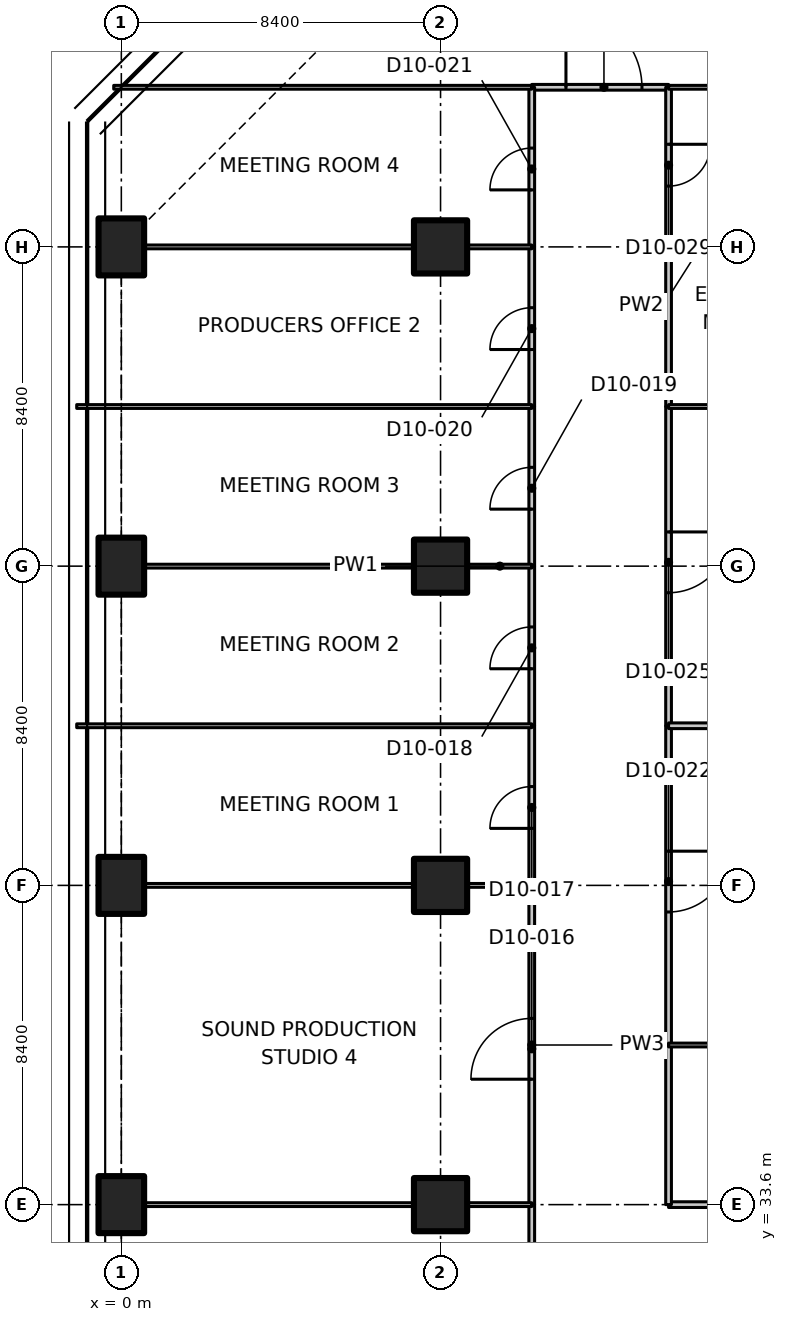
"""IFC4 building model, lengths in metres.
Left out: names, types, materials, properties, quantities, classifications, styles, units other than length and angle.
Written with IfcOpenShell. Run it as: python <this file> out.ifc"""

import sys

from ifc_helpers import new_model, si_unit, direction, frame, frame_2d, origin, origin_2d, place, context, subcontext, project, spatial, polyline, rectangle, outline, extrude, element, fill, save


model = new_model("IFC4")
c1 = context("Model", 3, precision=1e-05, world=origin(), true_north=direction((0.0, 1.0)))
c2 = subcontext(c1, "Body", "Model", "MODEL_VIEW")
j1 = project(units=[si_unit("LENGTHUNIT", "METRE"), si_unit("PLANEANGLEUNIT", "RADIAN")], contexts=[c1])
p1 = place(None, origin())
s1 = spatial("IfcSite", under=j1, at=p1, CompositionType="ELEMENT")
p2 = place(p1, origin())
s2 = spatial("IfcBuilding", under=s1, at=p2, CompositionType="ELEMENT")
p3 = place(p2, frame((0.0, 0.0, 72.5)))
s3 = spatial("IfcBuildingStorey", under=s2, at=p3, CompositionType="ELEMENT", Elevation=72.5)
for number, where, z_axis, x_axis in (
    (1, (0.0, 33.6, 0.0), (0.0, 0.0, 1.0), (1.0, 0.0, 0.0)),
    (2, (0.0, 42.0, 0.0), (0.0, 0.0, 1.0), (1.0, 0.0, 0.0)),
    (3, (0.0, 50.4, 0.0), (0.0, 0.0, 1.0), (1.0, 0.0, 0.0)),
    (4, (0.0, 58.8, 0.0), (0.0, 0.0, 1.0), (1.0, 0.0, 0.0)),
):
    element("IfcColumn", number, at=place(p3, frame(where, z_axis=z_axis, x_axis=x_axis)), inside=s3, PredefinedType="COLUMN", context=c2, shape_type="SweptSolid", body=[
        extrude(rectangle(XDim=1.2, YDim=1.5, at=origin_2d()), origin(), (0.0, 0.0, 1.0), 3.35),
    ])
for number, where, z_axis, x_axis in (
    (5, (8.4, 33.6, 0.0), (0.0, 0.0, 1.0), (1.0, 0.0, 0.0)),
    (6, (8.4, 42.0, 0.0), (0.0, 0.0, 1.0), (1.0, 0.0, 0.0)),
    (7, (8.4, 50.4, 0.0), (0.0, 0.0, 1.0), (1.0, 0.0, 0.0)),
    (8, (8.4, 58.8, 0.0), (0.0, 0.0, 1.0), (1.0, 0.0, 0.0)),
):
    element("IfcColumn", number, at=place(p3, frame(where, z_axis=z_axis, x_axis=x_axis)), inside=s3, PredefinedType="COLUMN", context=c2, shape_type="SweptSolid", body=[
        extrude(rectangle(XDim=1.4, YDim=1.4, at=origin_2d()), origin(), (0.0, 0.0, 1.0), 3.35),
    ])
p4 = place(p3, frame((10.8, 25.2, 0.0), z_axis=(0.0, 0.0, 1.0), x_axis=(0.0, 1.0, 0.0)))
e9 = element("IfcWall", 9, at=p4, inside=s3, PredefinedType="PARTITIONING", context=c2, shape_type="SweptSolid", body=[
    extrude(rectangle(XDim=8.4, YDim=0.15, at=frame_2d((4.2, 0.0))), origin(), (0.0, 0.0, 1.0), 3.33),
])
p5 = place(p4, frame((3.3, 0.0, 0.0)))
e10 = element("IfcOpeningElement", 10, at=p5, cuts=e9, PredefinedType="OPENING", context=c2, shape_type="SweptSolid", body=[
    extrude(rectangle(XDim=1.6, YDim=2.1, at=frame_2d((0.8, 1.05))), frame((0.0, 0.085, 0.0), z_axis=(0.0, -1.0, 0.0), x_axis=(1.0, 0.0, 0.0)), (0.0, 0.0, 1.0), 0.17),
])
p6 = place(p3, frame((14.4, 33.6, 0.0), z_axis=(0.0, 0.0, 1.0), x_axis=(1.0, 0.0, 0.0)))
e11 = element("IfcWall", 11, at=p6, inside=s3, PredefinedType="PARTITIONING", context=c2, shape_type="SweptSolid", body=[
    extrude(rectangle(XDim=1.5, YDim=0.15, at=frame_2d((0.75, 0.0))), origin(), (0.0, 0.0, 1.0), 3.33),
])
p7 = place(p3, frame((10.8, 63.0, 0.0), z_axis=(0.0, 0.0, 1.0), x_axis=(1.0, 0.0, 0.0)))
e12 = element("IfcWall", 12, at=p7, inside=s3, PredefinedType="PARTITIONING", context=c2, shape_type="SweptSolid", body=[
    extrude(rectangle(XDim=3.6, YDim=0.15, at=frame_2d((1.8, 0.0))), origin(), (0.0, 0.0, 1.0), 3.33),
])
p8 = place(p7, frame((0.9, 0.0, 0.0)))
e13 = element("IfcOpeningElement", 13, at=p8, cuts=e12, PredefinedType="OPENING", context=c2, shape_type="SweptSolid", body=[
    extrude(rectangle(XDim=2.0, YDim=2.4, at=frame_2d((1.0, 1.2))), frame((0.0, 0.085, 0.0), z_axis=(0.0, -1.0, 0.0), x_axis=(1.0, 0.0, 0.0)), (0.0, 0.0, 1.0), 0.17),
])
p9 = place(p3, frame((10.8, 33.6, 0.0), z_axis=(0.0, 0.0, 1.0), x_axis=(0.0, 1.0, 0.0)))
e14 = element("IfcWall", 14, at=p9, inside=s3, PredefinedType="PARTITIONING", context=c2, shape_type="SweptSolid", body=[
    extrude(rectangle(XDim=8.4, YDim=0.15, at=frame_2d((4.2, 0.0))), origin(), (0.0, 0.0, 1.0), 3.33),
])
p10 = place(p9, frame((3.3, 0.0, 0.0)))
e15 = element("IfcOpeningElement", 15, at=p10, cuts=e14, PredefinedType="OPENING", context=c2, shape_type="SweptSolid", body=[
    extrude(rectangle(XDim=1.6, YDim=2.1, at=frame_2d((0.8, 1.05))), frame((0.0, 0.085, 0.0), z_axis=(0.0, -1.0, 0.0), x_axis=(1.0, 0.0, 0.0)), (0.0, 0.0, 1.0), 0.17),
])
p11 = place(p3, frame((10.8, 42.0, 0.0), z_axis=(0.0, 0.0, 1.0), x_axis=(0.0, 1.0, 0.0)))
e16 = element("IfcWall", 16, at=p11, inside=s3, PredefinedType="PARTITIONING", context=c2, shape_type="SweptSolid", body=[
    extrude(rectangle(XDim=4.2, YDim=0.15, at=frame_2d((2.1, 0.0))), origin(), (0.0, 0.0, 1.0), 3.33),
])
p12 = place(p11, frame((1.5, 0.0, 0.0)))
e17 = element("IfcOpeningElement", 17, at=p12, cuts=e16, PredefinedType="OPENING", context=c2, shape_type="SweptSolid", body=[
    extrude(rectangle(XDim=1.1, YDim=2.1, at=frame_2d((0.55, 1.05))), frame((0.0, 0.085, 0.0), z_axis=(0.0, -1.0, 0.0), x_axis=(1.0, 0.0, 0.0)), (0.0, 0.0, 1.0), 0.17),
])
p13 = place(p3, frame((10.8, 46.2, 0.0), z_axis=(0.0, 0.0, 1.0), x_axis=(0.0, 1.0, 0.0)))
e18 = element("IfcWall", 18, at=p13, inside=s3, PredefinedType="PARTITIONING", context=c2, shape_type="SweptSolid", body=[
    extrude(rectangle(XDim=4.2, YDim=0.15, at=frame_2d((2.1, 0.0))), origin(), (0.0, 0.0, 1.0), 3.33),
])
p14 = place(p13, frame((1.5, 0.0, 0.0)))
e19 = element("IfcOpeningElement", 19, at=p14, cuts=e18, PredefinedType="OPENING", context=c2, shape_type="SweptSolid", body=[
    extrude(rectangle(XDim=1.1, YDim=2.1, at=frame_2d((0.55, 1.05))), frame((0.0, 0.085, 0.0), z_axis=(0.0, -1.0, 0.0), x_axis=(1.0, 0.0, 0.0)), (0.0, 0.0, 1.0), 0.17),
])
p15 = place(p3, frame((10.8, 50.4, 0.0), z_axis=(0.0, 0.0, 1.0), x_axis=(0.0, 1.0, 0.0)))
e20 = element("IfcWall", 20, at=p15, inside=s3, PredefinedType="PARTITIONING", context=c2, shape_type="SweptSolid", body=[
    extrude(rectangle(XDim=4.2, YDim=0.15, at=frame_2d((2.1, 0.0))), origin(), (0.0, 0.0, 1.0), 3.33),
])
p16 = place(p15, frame((1.5, 0.0, 0.0)))
e21 = element("IfcOpeningElement", 21, at=p16, cuts=e20, PredefinedType="OPENING", context=c2, shape_type="SweptSolid", body=[
    extrude(rectangle(XDim=1.1, YDim=2.1, at=frame_2d((0.55, 1.05))), frame((0.0, 0.085, 0.0), z_axis=(0.0, -1.0, 0.0), x_axis=(1.0, 0.0, 0.0)), (0.0, 0.0, 1.0), 0.17),
])
p17 = place(p3, frame((10.8, 54.6, 0.0), z_axis=(0.0, 0.0, 1.0), x_axis=(0.0, 1.0, 0.0)))
e22 = element("IfcWall", 22, at=p17, inside=s3, PredefinedType="PARTITIONING", context=c2, shape_type="SweptSolid", body=[
    extrude(rectangle(XDim=4.2, YDim=0.15, at=frame_2d((2.1, 0.0))), origin(), (0.0, 0.0, 1.0), 3.33),
])
p18 = place(p17, frame((1.5, 0.0, 0.0)))
e23 = element("IfcOpeningElement", 23, at=p18, cuts=e22, PredefinedType="OPENING", context=c2, shape_type="SweptSolid", body=[
    extrude(rectangle(XDim=1.1, YDim=2.1, at=frame_2d((0.55, 1.05))), frame((0.0, 0.085, 0.0), z_axis=(0.0, -1.0, 0.0), x_axis=(1.0, 0.0, 0.0)), (0.0, 0.0, 1.0), 0.17),
])
p19 = place(p3, frame((10.8, 58.8, 0.0), z_axis=(0.0, 0.0, 1.0), x_axis=(0.0, 1.0, 0.0)))
e24 = element("IfcWall", 24, at=p19, inside=s3, PredefinedType="PARTITIONING", context=c2, shape_type="SweptSolid", body=[
    extrude(rectangle(XDim=4.2, YDim=0.15, at=frame_2d((2.1, 0.0))), origin(), (0.0, 0.0, 1.0), 3.33),
])
p20 = place(p19, frame((1.5, 0.0, 0.0)))
e25 = element("IfcOpeningElement", 25, at=p20, cuts=e24, PredefinedType="OPENING", context=c2, shape_type="SweptSolid", body=[
    extrude(rectangle(XDim=1.1, YDim=2.1, at=frame_2d((0.55, 1.05))), frame((0.0, 0.085, 0.0), z_axis=(0.0, -1.0, 0.0), x_axis=(1.0, 0.0, 0.0)), (0.0, 0.0, 1.0), 0.17),
])
p21 = place(p3, frame((14.4, 46.2, 0.0), z_axis=(0.0, 0.0, 1.0), x_axis=(0.0, -1.0, 0.0)))
e26 = element("IfcWall", 26, at=p21, inside=s3, PredefinedType="PARTITIONING", context=c2, shape_type="SweptSolid", body=[
    extrude(rectangle(XDim=8.4, YDim=0.15, at=frame_2d((4.2, 0.0))), origin(), (0.0, 0.0, 1.0), 3.33),
])
p22 = place(p21, frame((3.3, 0.0, 0.0)))
e27 = element("IfcOpeningElement", 27, at=p22, cuts=e26, PredefinedType="OPENING", context=c2, shape_type="SweptSolid", body=[
    extrude(rectangle(XDim=1.6, YDim=2.1, at=frame_2d((0.8, 1.05))), frame((0.0, 0.085, 0.0), z_axis=(0.0, -1.0, 0.0), x_axis=(1.0, 0.0, 0.0)), (0.0, 0.0, 1.0), 0.17),
])
p23 = place(p3, frame((14.4, 37.8, 0.0), z_axis=(0.0, 0.0, 1.0), x_axis=(0.0, -1.0, 0.0)))
e28 = element("IfcWall", 28, at=p23, inside=s3, PredefinedType="PARTITIONING", context=c2, shape_type="SweptSolid", body=[
    extrude(rectangle(XDim=4.2, YDim=0.15, at=frame_2d((2.1, 0.0))), origin(), (0.0, 0.0, 1.0), 3.33),
])
p24 = place(p3, frame((14.4, 54.6, 0.0), z_axis=(0.0, 0.0, 1.0), x_axis=(0.0, -1.0, 0.0)))
e29 = element("IfcWall", 29, at=p24, inside=s3, PredefinedType="PARTITIONING", context=c2, shape_type="SweptSolid", body=[
    extrude(rectangle(XDim=8.4, YDim=0.15, at=frame_2d((4.2, 0.0))), origin(), (0.0, 0.0, 1.0), 3.33),
])
p25 = place(p24, frame((3.3, 0.0, 0.0)))
e30 = element("IfcOpeningElement", 30, at=p25, cuts=e29, PredefinedType="OPENING", context=c2, shape_type="SweptSolid", body=[
    extrude(rectangle(XDim=1.6, YDim=2.1, at=frame_2d((0.8, 1.05))), frame((0.0, 0.085, 0.0), z_axis=(0.0, -1.0, 0.0), x_axis=(1.0, 0.0, 0.0)), (0.0, 0.0, 1.0), 0.17),
])
p26 = place(p3, frame((14.4, 58.8, 0.0), z_axis=(0.0, 0.0, 1.0), x_axis=(0.0, -1.0, 0.0)))
e31 = element("IfcWall", 31, at=p26, inside=s3, PredefinedType="PARTITIONING", context=c2, shape_type="SweptSolid", body=[
    extrude(rectangle(XDim=4.2, YDim=0.15, at=frame_2d((2.1, 0.0))), origin(), (0.0, 0.0, 1.0), 3.33),
])
p27 = place(p3, frame((14.4, 63.0, 0.0), z_axis=(0.0, 0.0, 1.0), x_axis=(0.0, -1.0, 0.0)))
e32 = element("IfcWall", 32, at=p27, inside=s3, PredefinedType="PARTITIONING", context=c2, shape_type="SweptSolid", body=[
    extrude(rectangle(XDim=4.2, YDim=0.15, at=frame_2d((2.1, 0.0))), origin(), (0.0, 0.0, 1.0), 3.33),
])
p28 = place(p27, frame((1.5, 0.0, 0.0)))
e33 = element("IfcOpeningElement", 33, at=p28, cuts=e32, PredefinedType="OPENING", context=c2, shape_type="SweptSolid", body=[
    extrude(rectangle(XDim=1.1, YDim=2.1, at=frame_2d((0.55, 1.05))), frame((0.0, 0.085, 0.0), z_axis=(0.0, -1.0, 0.0), x_axis=(1.0, 0.0, 0.0)), (0.0, 0.0, 1.0), 0.17),
])
p29 = place(p3, frame((10.8, 63.0, 0.0), z_axis=(0.0, 0.0, 1.0), x_axis=(-1.0, 0.0, 0.0)))
e34 = element("IfcWall", 34, at=p29, inside=s3, PredefinedType="PARTITIONING", context=c2, shape_type="SweptSolid", body=[
    extrude(outline(polyline([(0.0, 0.0), (11.0, 0.0), (11.0, 3.33), (7.266, 3.33), (7.264, 2.98), (5.936, 2.98), (5.934, 3.33), (0.0, 3.33), (0.0, 0.0)])), frame((0.0, 0.05, 0.0), z_axis=(0.0, -1.0, 0.0), x_axis=(1.0, 0.0, 0.0)), (0.0, 0.0, 1.0), 0.1),
])
p30 = place(p3, frame((25.4, 63.0, 0.0), z_axis=(0.0, 0.0, 1.0), x_axis=(-1.0, 0.0, 0.0)))
e35 = element("IfcWall", 35, at=p30, inside=s3, PredefinedType="PARTITIONING", context=c2, shape_type="SweptSolid", body=[
    extrude(outline(polyline([(0.0, 0.0), (11.0, 0.0), (11.0, 3.33), (5.066, 3.33), (5.064, 2.98), (3.736, 2.98), (3.734, 3.33), (0.0, 3.33), (0.0, 0.0)])), frame((0.0, 0.05, 0.0), z_axis=(0.0, -1.0, 0.0), x_axis=(1.0, 0.0, 0.0)), (0.0, 0.0, 1.0), 0.1),
])
p31 = place(p3, frame((0.62, 33.6, 0.0), z_axis=(0.0, 0.0, 1.0), x_axis=(1.0, 0.0, 0.0)))
e36 = element("IfcWall", 36, at=p31, inside=s3, PredefinedType="PARTITIONING", context=c2, shape_type="SweptSolid", body=[
    extrude(rectangle(XDim=7.06, YDim=0.1, at=frame_2d((3.53, 0.0))), origin(), (0.0, 0.0, 1.0), 3.33),
])
p32 = place(p3, frame((9.12, 33.6, 0.0), z_axis=(0.0, 0.0, 1.0), x_axis=(1.0, 0.0, 0.0)))
e37 = element("IfcWall", 37, at=p32, inside=s3, PredefinedType="PARTITIONING", context=c2, shape_type="SweptSolid", body=[
    extrude(rectangle(XDim=1.68, YDim=0.1, at=frame_2d((0.84, 0.0))), origin(), (0.0, 0.0, 1.0), 3.33),
])
p33 = place(p3, frame((0.62, 42.0, 0.0), z_axis=(0.0, 0.0, 1.0), x_axis=(1.0, 0.0, 0.0)))
e38 = element("IfcWall", 38, at=p33, inside=s3, PredefinedType="PARTITIONING", context=c2, shape_type="SweptSolid", body=[
    extrude(rectangle(XDim=7.06, YDim=0.1, at=frame_2d((3.53, 0.0))), origin(), (0.0, 0.0, 1.0), 3.33),
])
p34 = place(p3, frame((9.12, 42.0, 0.0), z_axis=(0.0, 0.0, 1.0), x_axis=(1.0, 0.0, 0.0)))
e39 = element("IfcWall", 39, at=p34, inside=s3, PredefinedType="PARTITIONING", context=c2, shape_type="SweptSolid", body=[
    extrude(rectangle(XDim=1.68, YDim=0.1, at=frame_2d((0.84, 0.0))), origin(), (0.0, 0.0, 1.0), 3.33),
])
p35 = place(p3, frame((-1.174, 46.2, 0.0), z_axis=(0.0, 0.0, 1.0), x_axis=(1.0, 0.0, 0.0)))
e40 = element("IfcWall", 40, at=p35, inside=s3, PredefinedType="PARTITIONING", context=c2, shape_type="SweptSolid", body=[
    extrude(outline(polyline([(0.0, 0.0), (11.974, 0.0), (11.974, 3.33), (1.624, 3.33), (1.622, 2.98), (0.726, 2.98), (0.724, 3.33), (0.074, 3.33), (0.0, 3.33), (0.0, 0.0)])), frame((0.0, 0.05, 0.0), z_axis=(0.0, -1.0, 0.0), x_axis=(1.0, 0.0, 0.0)), (0.0, 0.0, 1.0), 0.1),
])
p36 = place(p3, frame((0.62, 50.4, 0.0), z_axis=(0.0, 0.0, 1.0), x_axis=(1.0, 0.0, 0.0)))
e41 = element("IfcWall", 41, at=p36, inside=s3, PredefinedType="PARTITIONING", context=c2, shape_type="SweptSolid", body=[
    extrude(rectangle(XDim=7.06, YDim=0.1, at=frame_2d((3.53, 0.0))), origin(), (0.0, 0.0, 1.0), 3.33),
])
p37 = place(p3, frame((9.12, 50.4, 0.0), z_axis=(0.0, 0.0, 1.0), x_axis=(1.0, 0.0, 0.0)))
e42 = element("IfcWall", 42, at=p37, inside=s3, PredefinedType="PARTITIONING", context=c2, shape_type="SweptSolid", body=[
    extrude(rectangle(XDim=1.68, YDim=0.1, at=frame_2d((0.84, 0.0))), origin(), (0.0, 0.0, 1.0), 3.33),
])
p38 = place(p3, frame((-1.174, 54.6, 0.0), z_axis=(0.0, 0.0, 1.0), x_axis=(1.0, 0.0, 0.0)))
e43 = element("IfcWall", 43, at=p38, inside=s3, PredefinedType="PARTITIONING", context=c2, shape_type="SweptSolid", body=[
    extrude(outline(polyline([(0.0, 0.0), (11.974, 0.0), (11.974, 3.33), (1.624, 3.33), (1.622, 2.98), (0.726, 2.98), (0.724, 3.33), (0.074, 3.33), (0.0, 3.33), (0.0, 0.0)])), frame((0.0, 0.05, 0.0), z_axis=(0.0, -1.0, 0.0), x_axis=(1.0, 0.0, 0.0)), (0.0, 0.0, 1.0), 0.1),
])
p39 = place(p3, frame((0.62, 58.8, 0.0), z_axis=(0.0, 0.0, 1.0), x_axis=(1.0, 0.0, 0.0)))
e44 = element("IfcWall", 44, at=p39, inside=s3, PredefinedType="PARTITIONING", context=c2, shape_type="SweptSolid", body=[
    extrude(rectangle(XDim=7.06, YDim=0.1, at=frame_2d((3.53, 0.0))), origin(), (0.0, 0.0, 1.0), 3.33),
])
p40 = place(p3, frame((9.12, 58.8, 0.0), z_axis=(0.0, 0.0, 1.0), x_axis=(1.0, 0.0, 0.0)))
e45 = element("IfcWall", 45, at=p40, inside=s3, PredefinedType="PARTITIONING", context=c2, shape_type="SweptSolid", body=[
    extrude(rectangle(XDim=1.68, YDim=0.1, at=frame_2d((0.84, 0.0))), origin(), (0.0, 0.0, 1.0), 3.33),
])
p41 = place(p3, frame((24.0, 37.8, 0.0), z_axis=(0.0, 0.0, 1.0), x_axis=(-1.0, 0.0, 0.0)))
e46 = element("IfcWall", 46, at=p41, inside=s3, PredefinedType="PARTITIONING", context=c2, shape_type="SweptSolid", body=[
    extrude(rectangle(XDim=9.6, YDim=0.1, at=frame_2d((4.8, 0.0))), origin(), (0.0, 0.0, 1.0), 3.33),
])
p42 = place(p41, frame((4.2, 0.0, 0.0)))
e47 = element("IfcOpeningElement", 47, at=p42, cuts=e46, PredefinedType="OPENING", context=c2, shape_type="SweptSolid", body=[
    extrude(rectangle(XDim=1.2, YDim=2.1, at=frame_2d((0.6, 1.05))), frame((0.0, 0.06, 0.0), z_axis=(0.0, -1.0, 0.0), x_axis=(1.0, 0.0, 0.0)), (0.0, 0.0, 1.0), 0.12),
])
p43 = place(p3, frame((14.4, 46.2, 0.0), z_axis=(0.0, 0.0, 1.0), x_axis=(1.0, 0.0, 0.0)))
e48 = element("IfcWall", 48, at=p43, inside=s3, PredefinedType="PARTITIONING", context=c2, shape_type="SweptSolid", body=[
    extrude(outline(polyline([(0.0, 0.0), (11.974, 0.0), (11.974, 3.33), (11.9, 3.33), (11.25, 3.33), (11.248, 2.98), (10.352, 2.98), (10.35, 3.33), (0.0, 3.33), (0.0, 0.0)])), frame((0.0, 0.075, 0.0), z_axis=(0.0, -1.0, 0.0), x_axis=(1.0, 0.0, 0.0)), (0.0, 0.0, 1.0), 0.15),
])
p44 = place(p3, frame((14.4, 54.6, 0.0), z_axis=(0.0, 0.0, 1.0), x_axis=(1.0, 0.0, 0.0)))
e49 = element("IfcWall", 49, at=p44, inside=s3, PredefinedType="PARTITIONING", context=c2, shape_type="SweptSolid", body=[
    extrude(rectangle(XDim=4.2, YDim=0.1, at=frame_2d((2.1, 0.0))), origin(), (0.0, 0.0, 1.0), 3.33),
])
p45 = place(p44, frame((1.8, 0.0, 0.0)))
e50 = element("IfcOpeningElement", 50, at=p45, cuts=e49, PredefinedType="OPENING", context=c2, shape_type="SweptSolid", body=[
    extrude(rectangle(XDim=0.9, YDim=2.1, at=frame_2d((0.45, 1.05))), frame((0.0, 0.06, 0.0), z_axis=(0.0, -1.0, 0.0), x_axis=(1.0, 0.0, 0.0)), (0.0, 0.0, 1.0), 0.12),
])
p46 = place(p3, frame((14.4, 58.8, 0.0), z_axis=(0.0, 0.0, 1.0), x_axis=(1.0, 0.0, 0.0)))
e51 = element("IfcWall", 51, at=p46, inside=s3, PredefinedType="PARTITIONING", context=c2, shape_type="SweptSolid", body=[
    extrude(rectangle(XDim=1.68, YDim=0.125, at=frame_2d((0.84, 0.0))), origin(), (0.0, 0.0, 1.0), 3.33),
])
p47 = place(p8, origin())
e52 = element("IfcDoor", 52, at=p47, inside=s3, OperationType="DOUBLE_DOOR_SINGLE_SWING", PredefinedType="DOOR", context=c2, shape_type="SweptSolid", body=[
    extrude(rectangle(XDim=2.0, YDim=2.4, at=frame_2d((1.0, 1.2))), frame((0.0, 0.025, 0.0), z_axis=(0.0, -1.0, 0.0), x_axis=(1.0, 0.0, 0.0)), (0.0, 0.0, 1.0), 0.05),
])
fill(e13, e52)
p48 = place(p10, origin())
e53 = element("IfcDoor", 53, at=p48, inside=s3, OperationType="DOUBLE_DOOR_SINGLE_SWING", PredefinedType="DOOR", context=c2, shape_type="SweptSolid", body=[
    extrude(rectangle(XDim=1.6, YDim=2.1, at=frame_2d((0.8, 1.05))), frame((0.0, 0.025, 0.0), z_axis=(0.0, -1.0, 0.0), x_axis=(1.0, 0.0, 0.0)), (0.0, 0.0, 1.0), 0.05),
])
fill(e15, e53)
p49 = place(p12, origin())
e54 = element("IfcDoor", 54, at=p49, inside=s3, OperationType="SINGLE_SWING_LEFT", PredefinedType="DOOR", context=c2, shape_type="SweptSolid", body=[
    extrude(rectangle(XDim=1.1, YDim=2.1, at=frame_2d((0.55, 1.05))), frame((0.0, 0.025, 0.0), z_axis=(0.0, -1.0, 0.0), x_axis=(1.0, 0.0, 0.0)), (0.0, 0.0, 1.0), 0.05),
])
fill(e17, e54)
p50 = place(p14, origin())
e55 = element("IfcDoor", 55, at=p50, inside=s3, OperationType="SINGLE_SWING_LEFT", PredefinedType="DOOR", context=c2, shape_type="SweptSolid", body=[
    extrude(rectangle(XDim=1.1, YDim=2.1, at=frame_2d((0.55, 1.05))), frame((0.0, 0.025, 0.0), z_axis=(0.0, -1.0, 0.0), x_axis=(1.0, 0.0, 0.0)), (0.0, 0.0, 1.0), 0.05),
])
fill(e19, e55)
p51 = place(p16, origin())
e56 = element("IfcDoor", 56, at=p51, inside=s3, OperationType="SINGLE_SWING_LEFT", PredefinedType="DOOR", context=c2, shape_type="SweptSolid", body=[
    extrude(rectangle(XDim=1.1, YDim=2.1, at=frame_2d((0.55, 1.05))), frame((0.0, 0.025, 0.0), z_axis=(0.0, -1.0, 0.0), x_axis=(1.0, 0.0, 0.0)), (0.0, 0.0, 1.0), 0.05),
])
fill(e21, e56)
p52 = place(p18, origin())
e57 = element("IfcDoor", 57, at=p52, inside=s3, OperationType="SINGLE_SWING_LEFT", PredefinedType="DOOR", context=c2, shape_type="SweptSolid", body=[
    extrude(rectangle(XDim=1.1, YDim=2.1, at=frame_2d((0.55, 1.05))), frame((0.0, 0.025, 0.0), z_axis=(0.0, -1.0, 0.0), x_axis=(1.0, 0.0, 0.0)), (0.0, 0.0, 1.0), 0.05),
])
fill(e23, e57)
p53 = place(p20, origin())
e58 = element("IfcDoor", 58, at=p53, inside=s3, OperationType="SINGLE_SWING_LEFT", PredefinedType="DOOR", context=c2, shape_type="SweptSolid", body=[
    extrude(rectangle(XDim=1.1, YDim=2.1, at=frame_2d((0.55, 1.05))), frame((0.0, 0.025, 0.0), z_axis=(0.0, -1.0, 0.0), x_axis=(1.0, 0.0, 0.0)), (0.0, 0.0, 1.0), 0.05),
])
fill(e25, e58)
p54 = place(p22, origin())
e59 = element("IfcDoor", 59, at=p54, inside=s3, OperationType="DOUBLE_DOOR_SINGLE_SWING", PredefinedType="DOOR", context=c2, shape_type="SweptSolid", body=[
    extrude(rectangle(XDim=1.6, YDim=2.1, at=frame_2d((0.8, 1.05))), frame((0.0, 0.025, 0.0), z_axis=(0.0, -1.0, 0.0), x_axis=(1.0, 0.0, 0.0)), (0.0, 0.0, 1.0), 0.05),
])
fill(e27, e59)
p55 = place(p25, origin())
e60 = element("IfcDoor", 60, at=p55, inside=s3, OperationType="DOUBLE_DOOR_SINGLE_SWING", PredefinedType="DOOR", context=c2, shape_type="SweptSolid", body=[
    extrude(rectangle(XDim=1.6, YDim=2.1, at=frame_2d((0.8, 1.05))), frame((0.0, 0.025, 0.0), z_axis=(0.0, -1.0, 0.0), x_axis=(1.0, 0.0, 0.0)), (0.0, 0.0, 1.0), 0.05),
])
fill(e30, e60)
p56 = place(p28, origin())
e61 = element("IfcDoor", 61, at=p56, inside=s3, OperationType="SINGLE_SWING_LEFT", PredefinedType="DOOR", context=c2, shape_type="SweptSolid", body=[
    extrude(rectangle(XDim=1.1, YDim=2.1, at=frame_2d((0.55, 1.05))), frame((0.0, 0.025, 0.0), z_axis=(0.0, -1.0, 0.0), x_axis=(1.0, 0.0, 0.0)), (0.0, 0.0, 1.0), 0.05),
])
fill(e33, e61)
save(model, sys.argv[1])
